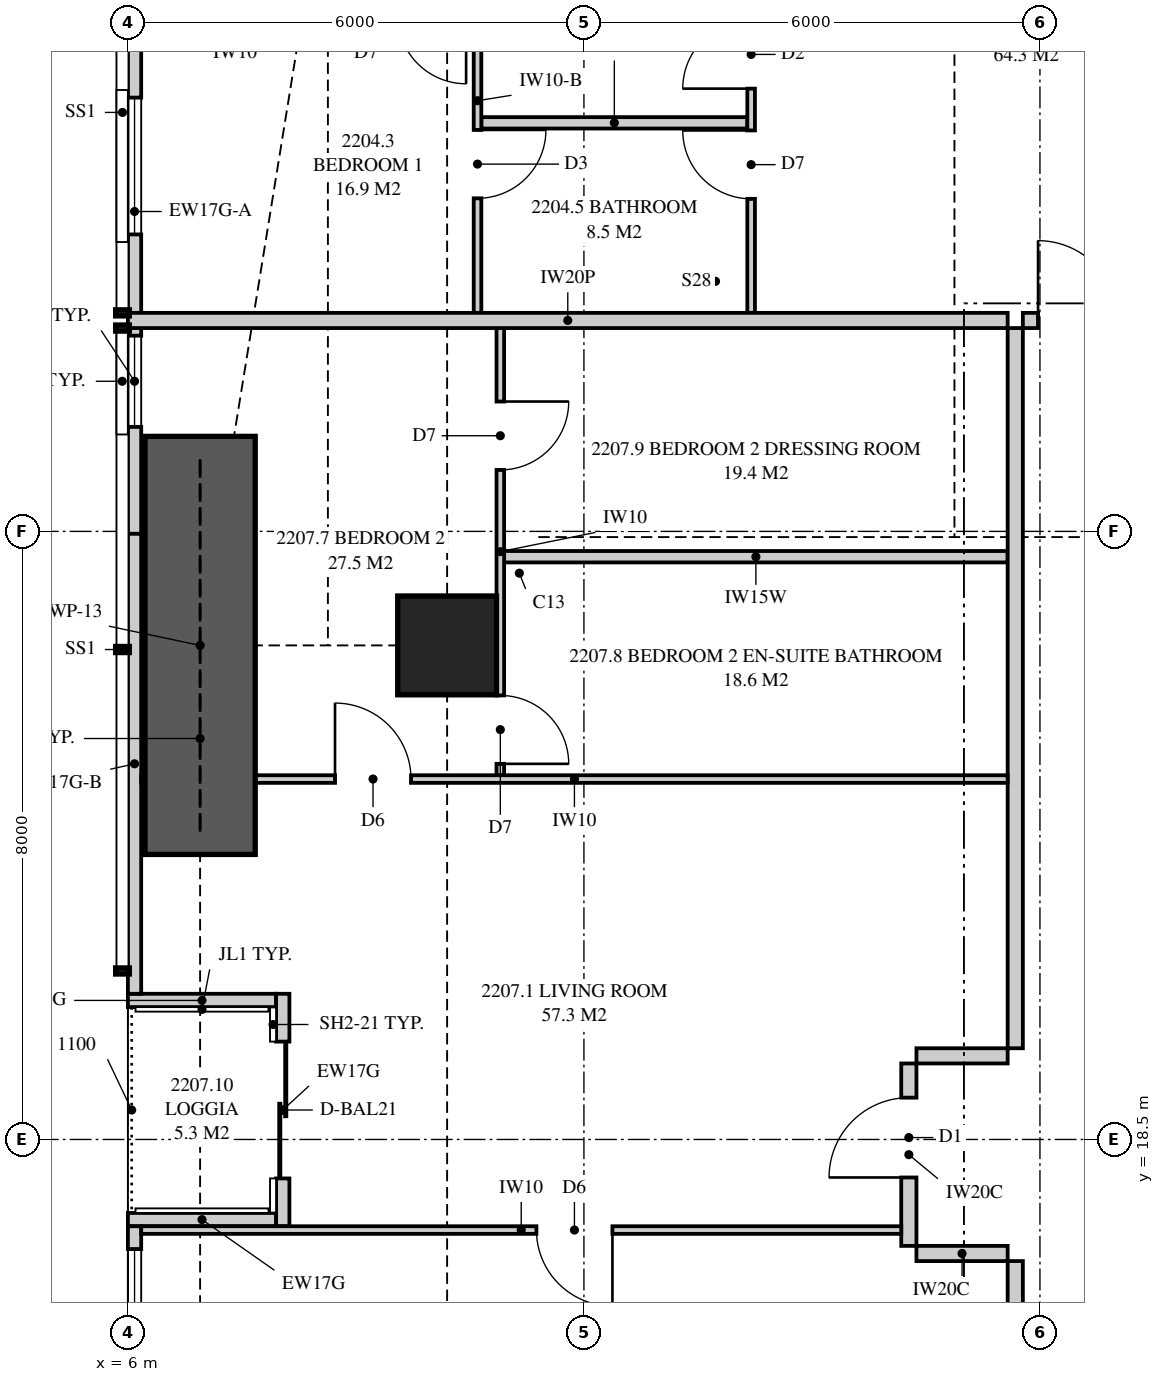
"""IFC4 building model, lengths in metres.
Left out: names, types, materials, properties, quantities, classifications, styles, units other than length and angle.
Written with IfcOpenShell. Run it as: python <this file> out.ifc"""

import sys

from ifc_helpers import new_model, si_unit, direction, frame, frame_2d, origin, origin_2d, place, context, subcontext, project, spatial, polyline, rectangle, outline, extrude, element, fill, save


model = new_model("IFC4")
c1 = context("Model", 3, precision=1e-05, world=origin(), true_north=direction((0.0, 1.0)))
c2 = subcontext(c1, "Body", "Model", "MODEL_VIEW")
j1 = project(units=[si_unit("LENGTHUNIT", "METRE"), si_unit("PLANEANGLEUNIT", "RADIAN")], contexts=[c1])
p1 = place(None, origin())
s1 = spatial("IfcSite", under=j1, at=p1, CompositionType="ELEMENT")
p2 = place(p1, origin())
s2 = spatial("IfcBuilding", under=s1, at=p2, CompositionType="ELEMENT")
p3 = place(p2, frame((0.0, 0.0, 84.75)))
s3 = spatial("IfcBuildingStorey", under=s2, at=p3, CompositionType="ELEMENT", Elevation=84.75)
p4 = place(p3, frame((10.2, 25.0, 0.0), z_axis=(0.0, 0.0, 1.0), x_axis=(1.0, 0.0, 0.0)))
e1 = element("IfcColumn", 1, at=p4, inside=s3, PredefinedType="COLUMN", context=c2, shape_type="SweptSolid", body=[
    extrude(rectangle(XDim=1.3, YDim=1.3, at=origin_2d()), origin(), (0.0, 0.0, 1.0), 3.35),
])
p5 = place(p3, frame((6.087, 34.949, 0.0), z_axis=(0.0, 0.0, 1.0), x_axis=(0.0, -1.0, 0.0)))
e2 = element("IfcWall", 2, at=p5, inside=s3, PredefinedType="SOLIDWALL", context=c2, shape_type="SweptSolid", body=[
    extrude(rectangle(XDim=8.481, YDim=0.175, at=frame_2d((4.24, 0.0))), origin(), (0.0, 0.0, 1.0), 3.11),
])
p6 = place(p5, frame((2.742, 0.0, 0.4)))
e3 = element("IfcOpeningElement", 3, at=p6, cuts=e2, PredefinedType="OPENING", context=c2, shape_type="SweptSolid", body=[
    extrude(rectangle(XDim=1.8, YDim=1.7, at=frame_2d((0.9, 0.85))), frame((0.0, 0.097, 0.0), z_axis=(0.0, -1.0, 0.0), x_axis=(1.0, 0.0, 0.0)), (0.0, 0.0, 1.0), 0.195),
])
p7 = place(p5, frame((5.874, 0.0, 0.4)))
e4 = element("IfcOpeningElement", 4, at=p7, cuts=e2, PredefinedType="OPENING", context=c2, shape_type="SweptSolid", body=[
    extrude(rectangle(XDim=1.2, YDim=1.7, at=frame_2d((0.6, 0.85))), frame((0.0, 0.097, 0.0), z_axis=(0.0, -1.0, 0.0), x_axis=(1.0, 0.0, 0.0)), (0.0, 0.0, 1.0), 0.195),
])
p8 = place(p3, frame((6.087, 26.468, 0.0), z_axis=(0.0, 0.0, 1.0), x_axis=(0.0, -1.0, 0.0)))
e5 = element("IfcWall", 5, at=p8, inside=s3, PredefinedType="SOLIDWALL", context=c2, shape_type="SweptSolid", body=[
    extrude(outline(polyline([(2.228, 0.092), (2.228, 0.0), (6.052, 0.0), (6.052, 2.15), (0.0, 2.15), (0.0, 0.0), (0.708, 0.0), (0.708, 0.092), (2.228, 0.092)])), frame((0.0, 0.087, 0.0), z_axis=(0.0, -1.0, 0.0), x_axis=(1.0, 0.0, 0.0)), (0.0, 0.0, 1.0), 0.175),
])
p9 = place(p3, frame((6.087, 17.358, 0.0), z_axis=(0.0, 0.0, 1.0), x_axis=(0.0, -1.0, 0.0)))
e6 = element("IfcWall", 6, at=p9, inside=s3, PredefinedType="SOLIDWALL", context=c2, shape_type="SweptSolid", body=[
    extrude(outline(polyline([(5.118, 0.092), (5.118, 0.0), (5.826, 0.0), (5.826, 2.15), (0.0, 2.15), (0.0, 0.0), (3.598, 0.0), (3.598, 0.092), (5.118, 0.092)])), frame((0.0, 0.087, 0.0), z_axis=(0.0, -1.0, 0.0), x_axis=(1.0, 0.0, 0.0)), (0.0, 0.0, 1.0), 0.175),
])
p10 = place(p9, frame((0.3, 0.0, 0.4)))
e7 = element("IfcOpeningElement", 7, at=p10, cuts=e6, PredefinedType="OPENING", context=c2, shape_type="SweptSolid", body=[
    extrude(rectangle(XDim=1.2, YDim=1.7, at=frame_2d((0.6, 0.85))), frame((0.0, 0.097, 0.0), z_axis=(0.0, -1.0, 0.0), x_axis=(1.0, 0.0, 0.0)), (0.0, 0.0, 1.0), 0.195),
])
p11 = place(p3, frame((8.038, 20.417, 0.0), z_axis=(0.0, 0.0, 1.0), x_axis=(0.0, -1.0, 0.0)))
e8 = element("IfcWall", 8, at=p11, inside=s3, PredefinedType="SOLIDWALL", context=c2, shape_type="SweptSolid", body=[
    extrude(rectangle(XDim=3.058, YDim=0.175, at=frame_2d((1.529, 0.0))), origin(), (0.0, 0.0, 1.0), 2.15),
])
p12 = place(p11, frame((0.629, 0.0, 0.0)))
e9 = element("IfcOpeningElement", 9, at=p12, cuts=e8, PredefinedType="OPENING", context=c2, shape_type="SweptSolid", body=[
    extrude(rectangle(XDim=1.8, YDim=2.1, at=frame_2d((0.9, 1.05))), frame((0.0, 0.097, 0.0), z_axis=(0.0, -1.0, 0.0), x_axis=(1.0, 0.0, 0.0)), (0.0, 0.0, 1.0), 0.195),
])
for number, where, z_axis, x_axis in (
    (10, (6.0, 20.329, 0.0), (0.0, 0.0, 1.0), (1.0, 0.0, 0.0)),
    (11, (6.0, 17.446, 0.0), (0.0, 0.0, 1.0), (1.0, 0.0, 0.0)),
):
    element("IfcWall", number, at=place(p3, frame(where, z_axis=z_axis, x_axis=x_axis)), inside=s3, PredefinedType="SOLIDWALL", context=c2, shape_type="SweptSolid", body=[
        extrude(rectangle(XDim=1.95, YDim=0.175, at=frame_2d((0.975, 0.0))), origin(), (0.0, 0.0, 1.0), 2.15),
    ])
p13 = place(p3, frame((17.775, 29.275, 0.0), z_axis=(0.0, 0.0, 1.0), x_axis=(1.0, 0.0, 0.0)))
e12 = element("IfcWall", 12, at=p13, inside=s3, PredefinedType="PARTITIONING", context=c2, shape_type="SweptSolid", body=[
    extrude(rectangle(XDim=8.875, YDim=0.2, at=frame_2d((4.438, 0.0))), origin(), (0.0, 0.0, 1.0), 3.11),
])
p14 = place(p13, frame((0.2, 0.0, 0.0)))
e13 = element("IfcOpeningElement", 13, at=p14, cuts=e12, PredefinedType="OPENING", context=c2, shape_type="SweptSolid", body=[
    extrude(rectangle(XDim=1.05, YDim=2.2, at=frame_2d((0.525, 1.1))), frame((0.0, 0.11, 0.0), z_axis=(0.0, -1.0, 0.0), x_axis=(1.0, 0.0, 0.0)), (0.0, 0.0, 1.0), 0.22),
])
p15 = place(p3, frame((10.6, 34.957, 0.0), z_axis=(0.0, 0.0, 1.0), x_axis=(0.0, -1.0, 0.0)))
e14 = element("IfcWall", 14, at=p15, inside=s3, PredefinedType="PARTITIONING", context=c2, shape_type="SweptSolid", body=[
    extrude(outline(polyline([(0.0, 0.0), (5.582, 0.0), (5.582, 2.51), (0.269, 2.51), (0.269, 2.15), (0.0, 2.15), (0.0, 0.0)])), frame((0.0, 0.05, 0.0), z_axis=(0.0, -1.0, 0.0), x_axis=(1.0, 0.0, 0.0)), (0.0, 0.0, 1.0), 0.1),
])
p16 = place(p15, frame((3.175, 0.0, 0.0)))
e15 = element("IfcOpeningElement", 15, at=p16, cuts=e14, PredefinedType="OPENING", context=c2, shape_type="SweptSolid", body=[
    extrude(rectangle(XDim=0.9, YDim=2.1, at=frame_2d((0.45, 1.05))), frame((0.0, 0.06, 0.0), z_axis=(0.0, -1.0, 0.0), x_axis=(1.0, 0.0, 0.0)), (0.0, 0.0, 1.0), 0.12),
])
p17 = place(p3, frame((14.2, 37.825, 0.0), z_axis=(0.0, 0.0, 1.0), x_axis=(0.0, -1.0, 0.0)))
e16 = element("IfcWall", 16, at=p17, inside=s3, PredefinedType="PARTITIONING", context=c2, shape_type="SweptSolid", body=[
    extrude(outline(polyline([(0.0, 0.0), (8.45, 0.0), (8.45, 3.11), (2.402, 3.11), (2.402, 2.15), (0.239, 2.15), (0.239, 3.11), (0.0, 3.11), (0.0, 0.0)])), frame((0.0, 0.05, 0.0), z_axis=(0.0, -1.0, 0.0), x_axis=(1.0, 0.0, 0.0)), (0.0, 0.0, 1.0), 0.1),
])
p18 = place(p17, frame((4.6, 0.0, 0.0)))
e17 = element("IfcOpeningElement", 17, at=p18, cuts=e16, PredefinedType="OPENING", context=c2, shape_type="SweptSolid", body=[
    extrude(rectangle(XDim=0.9, YDim=2.1, at=frame_2d((0.45, 1.05))), frame((0.0, 0.06, 0.0), z_axis=(0.0, -1.0, 0.0), x_axis=(1.0, 0.0, 0.0)), (0.0, 0.0, 1.0), 0.12),
])
p19 = place(p17, frame((6.05, 0.0, 0.0)))
e18 = element("IfcOpeningElement", 18, at=p19, cuts=e16, PredefinedType="OPENING", context=c2, shape_type="SweptSolid", body=[
    extrude(rectangle(XDim=0.9, YDim=2.1, at=frame_2d((0.45, 1.05))), frame((0.0, 0.06, 0.0), z_axis=(0.0, -1.0, 0.0), x_axis=(1.0, 0.0, 0.0)), (0.0, 0.0, 1.0), 0.12),
])
p20 = place(p3, frame((10.65, 31.875, 0.0), z_axis=(0.0, 0.0, 1.0), x_axis=(1.0, 0.0, 0.0)))
e19 = element("IfcWall", 19, at=p20, inside=s3, PredefinedType="PLUMBINGWALL", context=c2, shape_type="SweptSolid", body=[
    extrude(outline(polyline([(0.0, 0.0), (3.5, 0.0), (3.5, 3.11), (0.835, 3.11), (0.835, 2.51), (0.0, 2.51), (0.0, 3.11), (0.0, 0.0)])), frame((0.0, 0.075, 0.0), z_axis=(0.0, -1.0, 0.0), x_axis=(1.0, 0.0, 0.0)), (0.0, 0.0, 1.0), 0.15),
])
p21 = place(p3, frame((6.0, 29.275, 0.0), z_axis=(0.0, 0.0, 1.0), x_axis=(1.0, 0.0, 0.0)))
e20 = element("IfcWall", 20, at=p21, inside=s3, PredefinedType="PARTITIONING", context=c2, shape_type="SweptSolid", body=[
    extrude(outline(polyline([(0.0, 0.0), (11.575, 0.0), (11.575, 3.11), (11.221, 3.11), (11.221, 2.531), (10.529, 2.531), (10.529, 3.11), (5.51, 3.11), (5.51, 2.51), (2.978, 2.51), (2.978, 2.531), (2.768, 2.531), (2.768, 2.15), (0.519, 2.15), (0.519, 3.11), (0.0, 3.11), (0.0, 0.0)])), frame((0.0, 0.1, 0.0), z_axis=(0.0, -1.0, 0.0), x_axis=(1.0, 0.0, 0.0)), (0.0, 0.0, 1.0), 0.2),
])
p22 = place(p3, frame((17.675, 7.825, 0.0), z_axis=(0.0, 0.0, 1.0), x_axis=(0.0, 1.0, 0.0)))
e21 = element("IfcWall", 21, at=p22, inside=s3, PredefinedType="PARTITIONING", context=c2, shape_type="SweptSolid", body=[
    extrude(outline(polyline([(0.0, 0.0), (9.075, 0.0), (9.075, 3.11), (3.096, 3.11), (3.096, 2.531), (2.404, 2.531), (2.404, 3.11), (0.0, 3.11), (0.0, 0.0)])), frame((0.0, 0.1, 0.0), z_axis=(0.0, -1.0, 0.0), x_axis=(1.0, 0.0, 0.0)), (0.0, 0.0, 1.0), 0.2),
])
p23 = place(p3, frame((6.175, 17.308, 0.0), z_axis=(0.0, 0.0, 1.0), x_axis=(1.0, 0.0, 0.0)))
e22 = element("IfcWall", 22, at=p23, inside=s3, PredefinedType="PARTITIONING", context=c2, shape_type="SweptSolid", body=[
    extrude(outline(polyline([(0.0, 0.0), (10.0, 0.0), (10.0, 3.11), (5.285, 3.11), (5.285, 2.51), (2.765, 2.51), (2.765, 3.11), (1.835, 3.11), (1.835, 2.15), (0.0, 2.15), (0.0, 3.11), (0.0, 0.0)])), frame((0.0, 0.05, 0.0), z_axis=(0.0, -1.0, 0.0), x_axis=(1.0, 0.0, 0.0)), (0.0, 0.0, 1.0), 0.1),
])
p24 = place(p23, frame((5.2, 0.0, 0.0)))
e23 = element("IfcOpeningElement", 23, at=p24, cuts=e22, PredefinedType="OPENING", context=c2, shape_type="SweptSolid", body=[
    extrude(rectangle(XDim=1.0, YDim=2.1, at=frame_2d((0.5, 1.05))), frame((0.0, 0.06, 0.0), z_axis=(0.0, -1.0, 0.0), x_axis=(1.0, 0.0, 0.0)), (0.0, 0.0, 1.0), 0.12),
])
p25 = place(p3, frame((6.175, 23.242, 0.0), z_axis=(0.0, 0.0, 1.0), x_axis=(1.0, 0.0, 0.0)))
e24 = element("IfcWall", 24, at=p25, inside=s3, PredefinedType="PARTITIONING", context=c2, shape_type="SweptSolid", body=[
    extrude(outline(polyline([(0.0, 0.0), (11.4, 0.0), (11.4, 3.11), (5.285, 3.11), (5.285, 2.51), (2.765, 2.51), (2.765, 3.11), (1.835, 3.11), (1.835, 2.15), (1.021, 2.15), (1.021, 1.798), (0.529, 1.798), (0.529, 2.15), (0.0, 2.15), (0.0, 0.0)])), frame((0.0, 0.05, 0.0), z_axis=(0.0, -1.0, 0.0), x_axis=(1.0, 0.0, 0.0)), (0.0, 0.0, 1.0), 0.1),
])
p26 = place(p25, frame((2.55, 0.0, 0.0)))
e25 = element("IfcOpeningElement", 25, at=p26, cuts=e24, PredefinedType="OPENING", context=c2, shape_type="SweptSolid", body=[
    extrude(rectangle(XDim=1.0, YDim=2.1, at=frame_2d((0.5, 1.05))), frame((0.0, 0.06, 0.0), z_axis=(0.0, -1.0, 0.0), x_axis=(1.0, 0.0, 0.0)), (0.0, 0.0, 1.0), 0.12),
])
p27 = place(p3, frame((17.675, 19.7, 0.0), z_axis=(0.0, 0.0, 1.0), x_axis=(0.0, 1.0, 0.0)))
e26 = element("IfcWall", 26, at=p27, inside=s3, PredefinedType="PARTITIONING", context=c2, shape_type="SweptSolid", body=[
    extrude(outline(polyline([(0.0, 0.0), (9.475, 0.0), (9.475, 3.11), (7.071, 3.11), (7.071, 2.531), (6.379, 2.531), (6.379, 3.11), (0.0, 3.11), (0.0, 0.0)])), frame((0.0, 0.1, 0.0), z_axis=(0.0, -1.0, 0.0), x_axis=(1.0, 0.0, 0.0)), (0.0, 0.0, 1.0), 0.2),
])
p28 = place(p3, frame((16.275, 17.1, 0.0), z_axis=(0.0, 0.0, 1.0), x_axis=(0.0, 1.0, 0.0)))
e27 = element("IfcWall", 27, at=p28, inside=s3, PredefinedType="PARTITIONING", context=c2, shape_type="SweptSolid", body=[
    extrude(rectangle(XDim=2.4, YDim=0.2, at=frame_2d((1.2, 0.0))), origin(), (0.0, 0.0, 1.0), 3.11),
])
p29 = place(p28, frame((0.9, 0.0, 0.0)))
e28 = element("IfcOpeningElement", 28, at=p29, cuts=e27, PredefinedType="OPENING", context=c2, shape_type="SweptSolid", body=[
    extrude(rectangle(XDim=1.05, YDim=2.2, at=frame_2d((0.525, 1.1))), frame((0.0, 0.11, 0.0), z_axis=(0.0, -1.0, 0.0), x_axis=(1.0, 0.0, 0.0)), (0.0, 0.0, 1.0), 0.22),
])
for number, where, z_axis, x_axis in (
    (29, (17.575, 17.0, 0.0), (0.0, 0.0, 1.0), (-1.0, 0.0, 0.0)),
    (30, (17.575, 19.6, 0.0), (0.0, 0.0, 1.0), (-1.0, 0.0, 0.0)),
):
    element("IfcWall", number, at=place(p3, frame(where, z_axis=z_axis, x_axis=x_axis)), inside=s3, PredefinedType="PARTITIONING", context=c2, shape_type="SweptSolid", body=[
        extrude(rectangle(XDim=1.2, YDim=0.2, at=frame_2d((0.6, 0.0))), origin(), (0.0, 0.0, 1.0), 3.11),
    ])
p30 = place(p3, frame((10.9, 23.292, 0.0), z_axis=(0.0, 0.0, 1.0), x_axis=(0.0, 1.0, 0.0)))
e31 = element("IfcWall", 31, at=p30, inside=s3, PredefinedType="PARTITIONING", context=c2, shape_type="SweptSolid", body=[
    extrude(outline(polyline([(0.0, 0.0), (5.883, 0.0), (5.883, 3.11), (5.883, 2.51), (1.768, 2.51), (0.0, 2.51), (0.0, 3.11), (0.0, 0.0)])), frame((0.0, 0.05, 0.0), z_axis=(0.0, -1.0, 0.0), x_axis=(1.0, 0.0, 0.0)), (0.0, 0.0, 1.0), 0.1),
])
p31 = place(p30, frame((0.15, 0.0, 0.0)))
e32 = element("IfcOpeningElement", 32, at=p31, cuts=e31, PredefinedType="OPENING", context=c2, shape_type="SweptSolid", body=[
    extrude(rectangle(XDim=0.9, YDim=2.1, at=frame_2d((0.45, 1.05))), frame((0.0, 0.06, 0.0), z_axis=(0.0, -1.0, 0.0), x_axis=(1.0, 0.0, 0.0)), (0.0, 0.0, 1.0), 0.12),
])
p32 = place(p30, frame((4.017, 0.0, 0.0)))
e33 = element("IfcOpeningElement", 33, at=p32, cuts=e31, PredefinedType="OPENING", context=c2, shape_type="SweptSolid", body=[
    extrude(rectangle(XDim=0.9, YDim=2.1, at=frame_2d((0.45, 1.05))), frame((0.0, 0.06, 0.0), z_axis=(0.0, -1.0, 0.0), x_axis=(1.0, 0.0, 0.0)), (0.0, 0.0, 1.0), 0.12),
])
p33 = place(p3, frame((10.95, 26.167, 0.0), z_axis=(0.0, 0.0, 1.0), x_axis=(1.0, 0.0, 0.0)))
e34 = element("IfcWall", 34, at=p33, inside=s3, PredefinedType="PLUMBINGWALL", context=c2, shape_type="SweptSolid", body=[
    extrude(outline(polyline([(0.0, 0.0), (6.625, 0.0), (6.625, 3.11), (6.625, 2.531), (0.535, 2.531), (0.535, 2.51), (0.0, 2.51), (0.0, 3.11), (0.0, 0.0)])), frame((0.0, 0.075, 0.0), z_axis=(0.0, -1.0, 0.0), x_axis=(1.0, 0.0, 0.0)), (0.0, 0.0, 1.0), 0.15),
])
p34 = place(p3, frame((6.95, 22.25, 0.0), z_axis=(0.0, 0.0, 1.0), x_axis=(0.0, 1.0, 0.0)))
e35 = element("IfcWall", 35, at=p34, inside=s3, PredefinedType="SHEAR", context=c2, shape_type="SweptSolid", body=[
    extrude(rectangle(XDim=5.5, YDim=1.45, at=frame_2d((2.75, 0.0))), origin(), (0.0, 0.0, 1.0), 3.35),
])
p35 = place(p6, origin())
e36 = element("IfcWindow", 36, at=p35, inside=s3, PartitioningType="SINGLE_PANEL", PredefinedType="WINDOW", context=c2, shape_type="SweptSolid", body=[
    extrude(rectangle(XDim=1.8, YDim=1.7, at=frame_2d((0.9, 0.85))), frame((0.0, 0.03, 0.0), z_axis=(0.0, -1.0, 0.0), x_axis=(1.0, 0.0, 0.0)), (0.0, 0.0, 1.0), 0.06),
])
fill(e3, e36)
p36 = place(p7, origin())
e37 = element("IfcWindow", 37, at=p36, inside=s3, PartitioningType="SINGLE_PANEL", PredefinedType="WINDOW", context=c2, shape_type="SweptSolid", body=[
    extrude(rectangle(XDim=1.2, YDim=1.7, at=frame_2d((0.6, 0.85))), frame((0.0, 0.03, 0.0), z_axis=(0.0, -1.0, 0.0), x_axis=(1.0, 0.0, 0.0)), (0.0, 0.0, 1.0), 0.06),
])
fill(e4, e37)
p37 = place(p12, origin())
e38 = element("IfcDoor", 38, at=p37, inside=s3, OperationType="SLIDING_TO_LEFT", PredefinedType="DOOR", context=c2, shape_type="SweptSolid", body=[
    extrude(rectangle(XDim=1.8, YDim=2.1, at=frame_2d((0.9, 1.05))), frame((0.0, 0.025, 0.0), z_axis=(0.0, -1.0, 0.0), x_axis=(1.0, 0.0, 0.0)), (0.0, 0.0, 1.0), 0.05),
])
fill(e9, e38)
p38 = place(p10, origin())
e39 = element("IfcWindow", 39, at=p38, inside=s3, PartitioningType="SINGLE_PANEL", PredefinedType="WINDOW", context=c2, shape_type="SweptSolid", body=[
    extrude(rectangle(XDim=1.2, YDim=1.7, at=frame_2d((0.6, 0.85))), frame((0.0, 0.03, 0.0), z_axis=(0.0, -1.0, 0.0), x_axis=(1.0, 0.0, 0.0)), (0.0, 0.0, 1.0), 0.06),
])
fill(e7, e39)
p39 = place(p14, origin())
e40 = element("IfcDoor", 40, at=p39, inside=s3, OperationType="SINGLE_SWING_LEFT", PredefinedType="DOOR", context=c2, shape_type="SweptSolid", body=[
    extrude(rectangle(XDim=1.05, YDim=2.2, at=frame_2d((0.525, 1.1))), frame((0.0, 0.025, 0.0), z_axis=(0.0, -1.0, 0.0), x_axis=(1.0, 0.0, 0.0)), (0.0, 0.0, 1.0), 0.05),
])
fill(e13, e40)
p40 = place(p18, frame((0.9, 0.0, 0.0), z_axis=(0.0, 0.0, 1.0), x_axis=(-1.0, 0.0, 0.0)))
e41 = element("IfcDoor", 41, at=p40, inside=s3, OperationType="SINGLE_SWING_LEFT", PredefinedType="DOOR", context=c2, shape_type="SweptSolid", body=[
    extrude(rectangle(XDim=0.9, YDim=2.1, at=frame_2d((0.45, 1.05))), frame((0.0, 0.025, 0.0), z_axis=(0.0, -1.0, 0.0), x_axis=(1.0, 0.0, 0.0)), (0.0, 0.0, 1.0), 0.05),
])
fill(e17, e41)
p41 = place(p19, frame((0.9, 0.0, 0.0), z_axis=(0.0, 0.0, 1.0), x_axis=(-1.0, 0.0, 0.0)))
e42 = element("IfcDoor", 42, at=p41, inside=s3, OperationType="SINGLE_SWING_RIGHT", PredefinedType="DOOR", context=c2, shape_type="SweptSolid", body=[
    extrude(rectangle(XDim=0.9, YDim=2.1, at=frame_2d((0.45, 1.05))), frame((0.0, 0.025, 0.0), z_axis=(0.0, -1.0, 0.0), x_axis=(1.0, 0.0, 0.0)), (0.0, 0.0, 1.0), 0.05),
])
fill(e18, e42)
p42 = place(p16, origin())
e43 = element("IfcDoor", 43, at=p42, inside=s3, OperationType="SINGLE_SWING_LEFT", PredefinedType="DOOR", context=c2, shape_type="SweptSolid", body=[
    extrude(rectangle(XDim=0.9, YDim=2.1, at=frame_2d((0.45, 1.05))), frame((0.0, 0.025, 0.0), z_axis=(0.0, -1.0, 0.0), x_axis=(1.0, 0.0, 0.0)), (0.0, 0.0, 1.0), 0.05),
])
fill(e15, e43)
p43 = place(p29, origin())
e44 = element("IfcDoor", 44, at=p43, inside=s3, OperationType="SINGLE_SWING_LEFT", PredefinedType="DOOR", context=c2, shape_type="SweptSolid", body=[
    extrude(rectangle(XDim=1.05, YDim=2.2, at=frame_2d((0.525, 1.1))), frame((0.0, 0.025, 0.0), z_axis=(0.0, -1.0, 0.0), x_axis=(1.0, 0.0, 0.0)), (0.0, 0.0, 1.0), 0.05),
])
fill(e28, e44)
p44 = place(p24, frame((1.0, 0.0, 0.0), z_axis=(0.0, 0.0, 1.0), x_axis=(-1.0, 0.0, 0.0)))
e45 = element("IfcDoor", 45, at=p44, inside=s3, OperationType="SINGLE_SWING_LEFT", PredefinedType="DOOR", context=c2, shape_type="SweptSolid", body=[
    extrude(rectangle(XDim=1.0, YDim=2.1, at=frame_2d((0.5, 1.05))), frame((0.0, 0.025, 0.0), z_axis=(0.0, -1.0, 0.0), x_axis=(1.0, 0.0, 0.0)), (0.0, 0.0, 1.0), 0.05),
])
fill(e23, e45)
p45 = place(p26, origin())
e46 = element("IfcDoor", 46, at=p45, inside=s3, OperationType="SINGLE_SWING_LEFT", PredefinedType="DOOR", context=c2, shape_type="SweptSolid", body=[
    extrude(rectangle(XDim=1.0, YDim=2.1, at=frame_2d((0.5, 1.05))), frame((0.0, 0.025, 0.0), z_axis=(0.0, -1.0, 0.0), x_axis=(1.0, 0.0, 0.0)), (0.0, 0.0, 1.0), 0.05),
])
fill(e25, e46)
p46 = place(p31, frame((0.9, 0.0, 0.0), z_axis=(0.0, 0.0, 1.0), x_axis=(-1.0, 0.0, 0.0)))
e47 = element("IfcDoor", 47, at=p46, inside=s3, OperationType="SINGLE_SWING_RIGHT", PredefinedType="DOOR", context=c2, shape_type="SweptSolid", body=[
    extrude(rectangle(XDim=0.9, YDim=2.1, at=frame_2d((0.45, 1.05))), frame((0.0, 0.025, 0.0), z_axis=(0.0, -1.0, 0.0), x_axis=(1.0, 0.0, 0.0)), (0.0, 0.0, 1.0), 0.05),
])
fill(e32, e47)
p47 = place(p32, frame((0.9, 0.0, 0.0), z_axis=(0.0, 0.0, 1.0), x_axis=(-1.0, 0.0, 0.0)))
e48 = element("IfcDoor", 48, at=p47, inside=s3, OperationType="SINGLE_SWING_LEFT", PredefinedType="DOOR", context=c2, shape_type="SweptSolid", body=[
    extrude(rectangle(XDim=0.9, YDim=2.1, at=frame_2d((0.45, 1.05))), frame((0.0, 0.025, 0.0), z_axis=(0.0, -1.0, 0.0), x_axis=(1.0, 0.0, 0.0)), (0.0, 0.0, 1.0), 0.05),
])
fill(e33, e48)
save(model, sys.argv[1])
